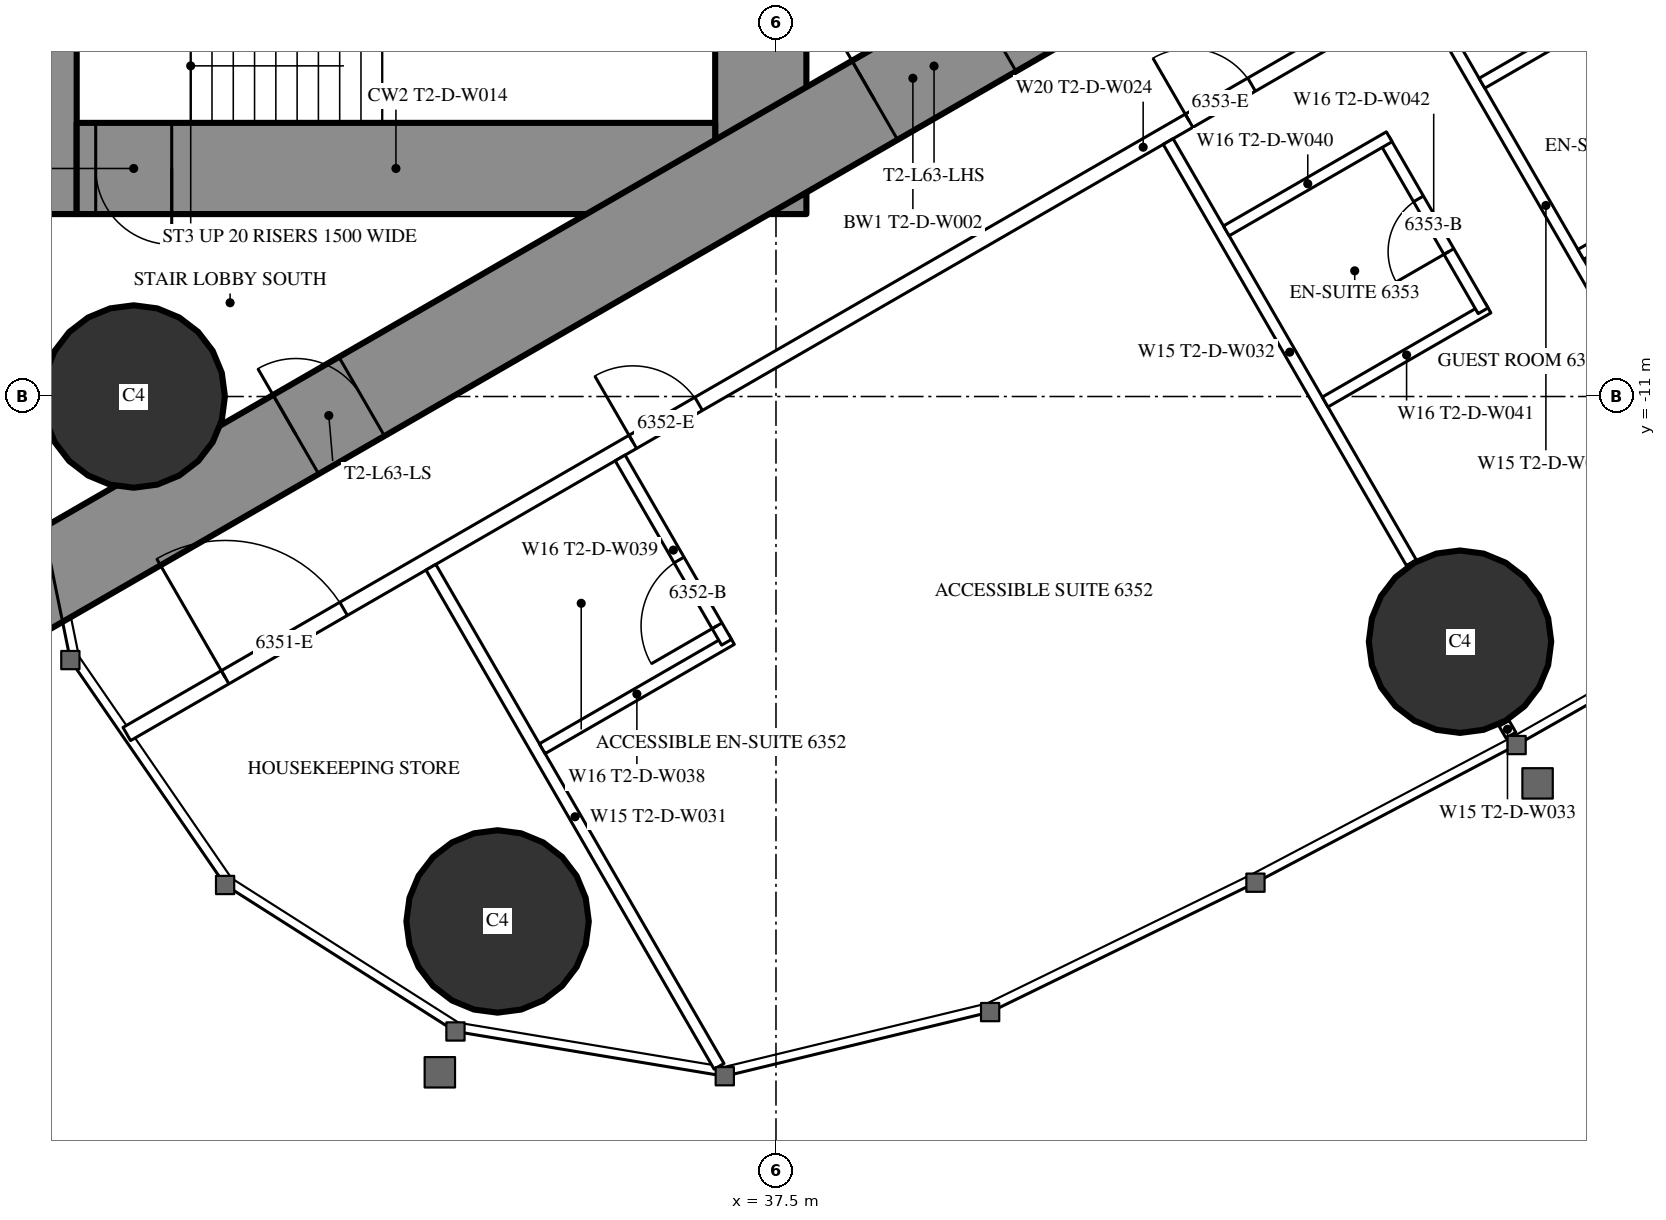
"""IFC4 building model, lengths in metres.
Left out: names, types, materials, properties, quantities, classifications, styles, units other than length and angle.
Written with IfcOpenShell. Run it as: python <this file> out.ifc"""

import sys

from ifc_helpers import new_model, si_unit, direction, frame, frame_2d, origin, origin_2d, place, context, subcontext, project, spatial, rectangle, circle, extrude, element, fill, save


model = new_model("IFC4")
c1 = context("Model", 3, precision=1e-05, world=origin(), true_north=direction((0.0, 1.0)))
c2 = subcontext(c1, "Body", "Model", "MODEL_VIEW")
j1 = project(units=[si_unit("LENGTHUNIT", "METRE"), si_unit("PLANEANGLEUNIT", "RADIAN")], contexts=[c1])
p1 = place(None, origin())
s1 = spatial("IfcSite", under=j1, at=p1, CompositionType="ELEMENT")
p2 = place(p1, origin())
s2 = spatial("IfcBuilding", under=s1, at=p2, CompositionType="ELEMENT")
p3 = place(p2, frame((0.0, 0.0, 236.9)))
s3 = spatial("IfcBuildingStorey", under=s2, at=p3, CompositionType="ELEMENT", Elevation=236.9)
for number, where, z_axis, x_axis in (
    (1, (33.837, -17.906, 0.0), (0.0, 0.0, 1.0), (1.0, 0.0, 0.0)),
    (2, (29.05, -11.0, 0.0), (0.0, 0.0, 1.0), (1.0, 0.0, 0.0)),
    (3, (46.499, -14.226, 0.0), (0.0, 0.0, 1.0), (1.0, 0.0, 0.0)),
):
    element("IfcColumn", number, at=place(p3, frame(where, z_axis=z_axis, x_axis=x_axis)), inside=s3, PredefinedType="COLUMN", context=c2, shape_type="SweptSolid", body=[
        extrude(circle(Radius=1.2, at=origin_2d()), origin(), (0.0, 0.0, 1.0), 3.6),
    ])
p4 = place(p3, frame((27.9, -8.6, 0.0), z_axis=(0.0, 0.0, 1.0), x_axis=(0.0, 1.0, 0.0)))
e4 = element("IfcWall", 4, at=p4, inside=s3, PredefinedType="SHEAR", context=c2, shape_type="SweptSolid", body=[
    extrude(rectangle(XDim=17.2, YDim=0.8, at=frame_2d((8.6, 0.0))), origin(), (0.0, 0.0, 1.0), 3.6),
])
p5 = place(p4, frame((9.35, 0.0, 0.0)))
e5 = element("IfcOpeningElement", 5, at=p5, cuts=e4, PredefinedType="OPENING", context=c2, shape_type="SweptSolid", body=[
    extrude(rectangle(XDim=0.9, YDim=2.2, at=frame_2d((0.45, 1.1))), frame((0.0, 0.41, 0.0), z_axis=(0.0, -1.0, 0.0), x_axis=(1.0, 0.0, 0.0)), (0.0, 0.0, 1.0), 0.82),
])
p6 = place(p3, frame((37.3, -8.6, 0.0), z_axis=(0.0, 0.0, 1.0), x_axis=(0.0, 1.0, 0.0)))
e6 = element("IfcWall", 6, at=p6, inside=s3, PredefinedType="SHEAR", context=c2, shape_type="SweptSolid", body=[
    extrude(rectangle(XDim=17.2, YDim=1.2, at=frame_2d((8.6, 0.0))), origin(), (0.0, 0.0, 1.0), 3.6),
])
p7 = place(p6, frame((7.7, 0.0, 0.0)))
e7 = element("IfcOpeningElement", 7, at=p7, cuts=e6, PredefinedType="OPENING", context=c2, shape_type="SweptSolid", body=[
    extrude(rectangle(XDim=1.8, YDim=2.2, at=frame_2d((0.9, 1.1))), frame((0.0, 0.61, 0.0), z_axis=(0.0, -1.0, 0.0), x_axis=(1.0, 0.0, 0.0)), (0.0, 0.0, 1.0), 1.22),
])
p8 = place(p3, frame((28.3, -8.0, 0.0), z_axis=(0.0, 0.0, 1.0), x_axis=(1.0, 0.0, 0.0)))
e8 = element("IfcWall", 8, at=p8, inside=s3, PredefinedType="SHEAR", context=c2, shape_type="SweptSolid", body=[
    extrude(rectangle(XDim=8.4, YDim=1.2, at=frame_2d((4.2, 0.0))), origin(), (0.0, 0.0, 1.0), 3.6),
])
p9 = place(p8, frame((0.25, 0.0, 0.0)))
e9 = element("IfcOpeningElement", 9, at=p9, cuts=e8, PredefinedType="OPENING", context=c2, shape_type="SweptSolid", body=[
    extrude(rectangle(XDim=1.0, YDim=2.2, at=frame_2d((0.5, 1.1))), frame((0.0, 0.61, 0.0), z_axis=(0.0, -1.0, 0.0), x_axis=(1.0, 0.0, 0.0)), (0.0, 0.0, 1.0), 1.22),
])
p10 = place(p3, frame((27.2, -13.8, 0.0), z_axis=(0.0, 0.0, 1.0), x_axis=(0.866027159892, 0.499996958321, 0.0)))
e10 = element("IfcWall", 10, at=p10, inside=s3, PredefinedType="SHEAR", context=c2, shape_type="SweptSolid", body=[
    extrude(rectangle(XDim=27.947, YDim=1.2, at=frame_2d((13.973, 0.0))), origin(), (0.0, 0.0, 1.0), 3.6),
])
p11 = place(p10, frame((4.6, 0.0, 0.0)))
e11 = element("IfcOpeningElement", 11, at=p11, cuts=e10, PredefinedType="OPENING", context=c2, shape_type="SweptSolid", body=[
    extrude(rectangle(XDim=1.0, YDim=2.2, at=frame_2d((0.5, 1.1))), frame((0.0, 0.61, 0.0), z_axis=(0.0, -1.0, 0.0), x_axis=(1.0, 0.0, 0.0)), (0.0, 0.0, 1.0), 1.22),
])
p12 = place(p10, frame((13.395, 0.0, 0.0)))
e12 = element("IfcOpeningElement", 12, at=p12, cuts=e10, PredefinedType="OPENING", context=c2, shape_type="SweptSolid", body=[
    extrude(rectangle(XDim=1.8, YDim=2.2, at=frame_2d((0.9, 1.1))), frame((0.0, 0.61, 0.0), z_axis=(0.0, -1.0, 0.0), x_axis=(1.0, 0.0, 0.0)), (0.0, 0.0, 1.0), 1.22),
])
p13 = place(p3, frame((28.959, -15.44, 0.0), z_axis=(0.0, 0.0, 1.0), x_axis=(0.866025227435, 0.500000305447, 0.0)))
e13 = element("IfcWall", 13, at=p13, inside=s3, PredefinedType="PARTITIONING", context=c2, shape_type="SweptSolid", body=[
    extrude(rectangle(XDim=30.88, YDim=0.2, at=frame_2d((15.44, 0.0))), origin(), (0.0, 0.0, 1.0), 3.35),
])
p14 = place(p13, frame((1.494, 0.0, 0.0)))
e14 = element("IfcOpeningElement", 14, at=p14, cuts=e13, PredefinedType="OPENING", context=c2, shape_type="SweptSolid", body=[
    extrude(rectangle(XDim=1.8, YDim=2.03, at=frame_2d((0.9, 1.015))), frame((0.0, 0.11, 0.0), z_axis=(0.0, -1.0, 0.0), x_axis=(1.0, 0.0, 0.0)), (0.0, 0.0, 1.0), 0.22),
])
p15 = place(p13, frame((7.687, 0.0, 0.0)))
e15 = element("IfcOpeningElement", 15, at=p15, cuts=e13, PredefinedType="OPENING", context=c2, shape_type="SweptSolid", body=[
    extrude(rectangle(XDim=1.0, YDim=2.2, at=frame_2d((0.5, 1.1))), frame((0.0, 0.11, 0.0), z_axis=(0.0, -1.0, 0.0), x_axis=(1.0, 0.0, 0.0)), (0.0, 0.0, 1.0), 0.22),
])
p16 = place(p13, frame((16.137, 0.0, 0.0)))
e16 = element("IfcOpeningElement", 16, at=p16, cuts=e13, PredefinedType="OPENING", context=c2, shape_type="SweptSolid", body=[
    extrude(rectangle(XDim=0.95, YDim=2.2, at=frame_2d((0.475, 1.1))), frame((0.0, 0.11, 0.0), z_axis=(0.0, -1.0, 0.0), x_axis=(1.0, 0.0, 0.0)), (0.0, 0.0, 1.0), 0.22),
])
p17 = place(p13, frame((20.021, 0.0, 0.0)))
e17 = element("IfcOpeningElement", 17, at=p17, cuts=e13, PredefinedType="OPENING", context=c2, shape_type="SweptSolid", body=[
    extrude(rectangle(XDim=0.95, YDim=2.2, at=frame_2d((0.475, 1.1))), frame((0.0, 0.11, 0.0), z_axis=(0.0, -1.0, 0.0), x_axis=(1.0, 0.0, 0.0)), (0.0, 0.0, 1.0), 0.22),
])
p18 = place(p13, frame((26.253, 0.0, 0.0)))
e18 = element("IfcOpeningElement", 18, at=p18, cuts=e13, PredefinedType="OPENING", context=c2, shape_type="SweptSolid", body=[
    extrude(rectangle(XDim=0.95, YDim=2.2, at=frame_2d((0.475, 1.1))), frame((0.0, 0.11, 0.0), z_axis=(0.0, -1.0, 0.0), x_axis=(1.0, 0.0, 0.0)), (0.0, 0.0, 1.0), 0.22),
])
p19 = place(p3, frame((32.96, -13.246, 0.0), z_axis=(0.0, 0.0, 1.0), x_axis=(0.500000236886, -0.866025267018, 0.0)))
e19 = element("IfcWall", 19, at=p19, inside=s3, PredefinedType="PARTITIONING", context=c2, shape_type="SweptSolid", body=[
    extrude(rectangle(XDim=7.583, YDim=0.15, at=frame_2d((3.791, 0.0))), origin(), (0.0, 0.0, 1.0), 3.35),
])
p20 = place(p3, frame((42.66, -7.646, 0.0), z_axis=(0.0, 0.0, 1.0), x_axis=(0.499996592859, -0.866027370889, 0.0)))
e20 = element("IfcWall", 20, at=p20, inside=s3, PredefinedType="PARTITIONING", context=c2, shape_type="SweptSolid", body=[
    extrude(rectangle(XDim=6.398, YDim=0.15, at=frame_2d((3.199, 0.0))), origin(), (0.0, 0.0, 1.0), 2.45),
])
p21 = place(p3, frame((47.079, -15.3, 0.0), z_axis=(0.0, 0.0, 1.0), x_axis=(0.499212083968, -0.866479829667, 0.0)))
e21 = element("IfcWall", 21, at=p21, inside=s3, PredefinedType="PARTITIONING", context=c2, shape_type="SweptSolid", body=[
    extrude(rectangle(XDim=0.179, YDim=0.15, at=frame_2d((0.09, 0.0))), origin(), (0.0, 0.0, 1.0), 2.45),
])
p22 = place(p3, frame((46.023, -5.704, 0.0), z_axis=(0.0, 0.0, 1.0), x_axis=(0.499984478165, -0.866034365135, 0.0)))
e22 = element("IfcWall", 22, at=p22, inside=s3, PredefinedType="PARTITIONING", context=c2, shape_type="SweptSolid", body=[
    extrude(rectangle(XDim=6.426, YDim=0.15, at=frame_2d((3.213, 0.0))), origin(), (0.0, 0.0, 1.0), 2.45),
])
p23 = place(p3, frame((34.425, -15.633, 0.0), z_axis=(0.0, 0.0, 1.0), x_axis=(0.866018712932, 0.500011588718, 0.0)))
e23 = element("IfcWall", 23, at=p23, inside=s3, PredefinedType="PARTITIONING", context=c2, shape_type="SweptSolid", body=[
    extrude(rectangle(XDim=2.875, YDim=0.15, at=frame_2d((1.438, 0.0))), origin(), (0.0, 0.0, 1.0), 3.35),
])
p24 = place(p3, frame((35.45, -11.808, 0.0), z_axis=(0.0, 0.0, 1.0), x_axis=(0.49994636267, -0.866056369097, 0.0)))
e24 = element("IfcWall", 24, at=p24, inside=s3, PredefinedType="PARTITIONING", context=c2, shape_type="SweptSolid", body=[
    extrude(rectangle(XDim=2.8, YDim=0.15, at=frame_2d((1.4, 0.0))), origin(), (0.0, 0.0, 1.0), 3.35),
])
p25 = place(p24, frame((1.55, 0.0, 0.0)))
e25 = element("IfcOpeningElement", 25, at=p25, cuts=e24, PredefinedType="OPENING", context=c2, shape_type="SweptSolid", body=[
    extrude(rectangle(XDim=1.0, YDim=2.2, at=frame_2d((0.5, 1.1))), frame((0.0, 0.085, 0.0), z_axis=(0.0, -1.0, 0.0), x_axis=(1.0, 0.0, 0.0)), (0.0, 0.0, 1.0), 0.17),
])
p26 = place(p3, frame((44.725, -11.072, 0.0), z_axis=(0.0, 0.0, 1.0), x_axis=(0.866006523861, 0.500032699561, 0.0)))
e26 = element("IfcWall", 26, at=p26, inside=s3, PredefinedType="PARTITIONING", context=c2, shape_type="SweptSolid", body=[
    extrude(rectangle(XDim=2.475, YDim=0.15, at=frame_2d((1.237, 0.0))), origin(), (0.0, 0.0, 1.0), 3.35),
])
p27 = place(p3, frame((45.503, -7.621, 0.0), z_axis=(0.0, 0.0, 1.0), x_axis=(0.500006934395, -0.866021400173, 0.0)))
e27 = element("IfcWall", 27, at=p27, inside=s3, PredefinedType="PARTITIONING", context=c2, shape_type="SweptSolid", body=[
    extrude(rectangle(XDim=2.6, YDim=0.15, at=frame_2d((1.3, 0.0))), origin(), (0.0, 0.0, 1.0), 3.35),
])
p28 = place(p27, frame((0.9, 0.0, 0.0)))
e28 = element("IfcOpeningElement", 28, at=p28, cuts=e27, PredefinedType="OPENING", context=c2, shape_type="SweptSolid", body=[
    extrude(rectangle(XDim=0.8, YDim=2.2, at=frame_2d((0.4, 1.1))), frame((0.0, 0.085, 0.0), z_axis=(0.0, -1.0, 0.0), x_axis=(1.0, 0.0, 0.0)), (0.0, 0.0, 1.0), 0.17),
])
for number, where, z_axis, x_axis in (
    (29, (43.425, -8.821, 0.0), (0.0, 0.0, 1.0), (0.866, 0.5, 0.0)),
    (30, (48.088, -9.13, 0.0), (0.0, 0.0, 1.0), (0.866, 0.5, 0.0)),
    (31, (46.788, -6.879, 0.0), (0.0, 0.0, 1.0), (0.866, 0.5, 0.0)),
):
    element("IfcWall", number, at=place(p3, frame(where, z_axis=z_axis, x_axis=x_axis)), inside=s3, PredefinedType="PARTITIONING", context=c2, shape_type="SweptSolid", body=[
        extrude(rectangle(XDim=2.475, YDim=0.15, at=frame_2d((1.237, 0.0))), origin(), (0.0, 0.0, 1.0), 3.35),
    ])
p29 = place(p14, origin())
e32 = element("IfcDoor", 32, at=p29, inside=s3, OperationType="DOUBLE_DOOR_SINGLE_SWING", PredefinedType="DOOR", context=c2, shape_type="SweptSolid", body=[
    extrude(rectangle(XDim=1.8, YDim=2.03, at=frame_2d((0.9, 1.015))), frame((0.0, 0.025, 0.0), z_axis=(0.0, -1.0, 0.0), x_axis=(1.0, 0.0, 0.0)), (0.0, 0.0, 1.0), 0.05),
])
fill(e14, e32)
p30 = place(p25, origin())
e33 = element("IfcDoor", 33, at=p30, inside=s3, OperationType="SINGLE_SWING_RIGHT", PredefinedType="DOOR", context=c2, shape_type="SweptSolid", body=[
    extrude(rectangle(XDim=1.0, YDim=2.2, at=frame_2d((0.5, 1.1))), frame((0.0, 0.025, 0.0), z_axis=(0.0, -1.0, 0.0), x_axis=(1.0, 0.0, 0.0)), (0.0, 0.0, 1.0), 0.05),
])
fill(e25, e33)
p31 = place(p15, origin())
e34 = element("IfcDoor", 34, at=p31, inside=s3, OperationType="SINGLE_SWING_LEFT", PredefinedType="DOOR", context=c2, shape_type="SweptSolid", body=[
    extrude(rectangle(XDim=1.0, YDim=2.2, at=frame_2d((0.5, 1.1))), frame((0.0, 0.025, 0.0), z_axis=(0.0, -1.0, 0.0), x_axis=(1.0, 0.0, 0.0)), (0.0, 0.0, 1.0), 0.05),
])
fill(e15, e34)
p32 = place(p28, origin())
e35 = element("IfcDoor", 35, at=p32, inside=s3, OperationType="SINGLE_SWING_RIGHT", PredefinedType="DOOR", context=c2, shape_type="SweptSolid", body=[
    extrude(rectangle(XDim=0.8, YDim=2.2, at=frame_2d((0.4, 1.1))), frame((0.0, 0.025, 0.0), z_axis=(0.0, -1.0, 0.0), x_axis=(1.0, 0.0, 0.0)), (0.0, 0.0, 1.0), 0.05),
])
fill(e28, e35)
p33 = place(p16, origin())
e36 = element("IfcDoor", 36, at=p33, inside=s3, OperationType="SINGLE_SWING_LEFT", PredefinedType="DOOR", context=c2, shape_type="SweptSolid", body=[
    extrude(rectangle(XDim=0.95, YDim=2.2, at=frame_2d((0.475, 1.1))), frame((0.0, 0.025, 0.0), z_axis=(0.0, -1.0, 0.0), x_axis=(1.0, 0.0, 0.0)), (0.0, 0.0, 1.0), 0.05),
])
fill(e16, e36)
p34 = place(p11, origin())
e37 = element("IfcDoor", 37, at=p34, inside=s3, OperationType="SINGLE_SWING_LEFT", PredefinedType="DOOR", context=c2, shape_type="SweptSolid", body=[
    extrude(rectangle(XDim=1.0, YDim=2.2, at=frame_2d((0.5, 1.1))), frame((0.0, 0.025, 0.0), z_axis=(0.0, -1.0, 0.0), x_axis=(1.0, 0.0, 0.0)), (0.0, 0.0, 1.0), 0.05),
])
fill(e11, e37)
p35 = place(p12, origin())
e38 = element("IfcDoor", 38, at=p35, inside=s3, OperationType="DOUBLE_DOOR_SINGLE_SWING", PredefinedType="DOOR", context=c2, shape_type="SweptSolid", body=[
    extrude(rectangle(XDim=1.8, YDim=2.2, at=frame_2d((0.9, 1.1))), frame((0.0, 0.025, 0.0), z_axis=(0.0, -1.0, 0.0), x_axis=(1.0, 0.0, 0.0)), (0.0, 0.0, 1.0), 0.05),
])
fill(e12, e38)
p36 = place(p9, origin())
e39 = element("IfcDoor", 39, at=p36, inside=s3, OperationType="SINGLE_SWING_RIGHT", PredefinedType="DOOR", context=c2, shape_type="SweptSolid", body=[
    extrude(rectangle(XDim=1.0, YDim=2.2, at=frame_2d((0.5, 1.1))), frame((0.0, 0.025, 0.0), z_axis=(0.0, -1.0, 0.0), x_axis=(1.0, 0.0, 0.0)), (0.0, 0.0, 1.0), 0.05),
])
fill(e9, e39)
save(model, sys.argv[1])
